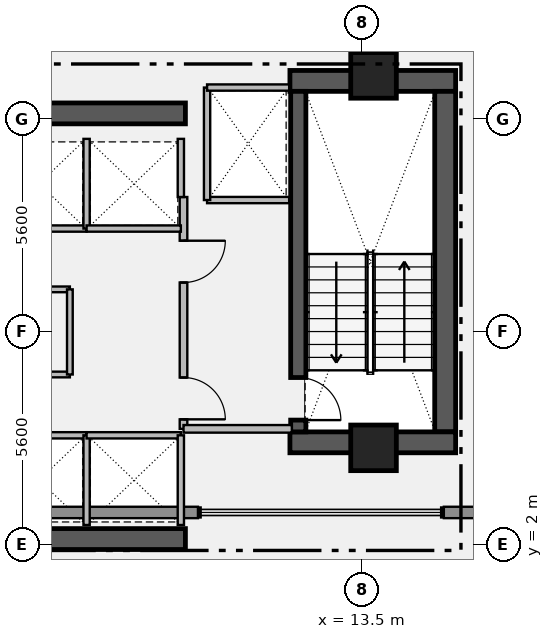
"""IFC4 building model, lengths in metres.
Left out: names, types, materials, properties, quantities, classifications, styles, units other than length and angle.
Written with IfcOpenShell. Run it as: python <this file> out.ifc"""

import sys

from ifc_helpers import new_model, si_unit, direction, frame, frame_2d, origin, origin_2d, place, context, subcontext, project, spatial, rectangle, extrude, element, fill, save


model = new_model("IFC4")
c1 = context("Model", 3, precision=1e-05, world=origin(), true_north=direction((0.0, 1.0)))
c2 = subcontext(c1, "Body", "Model", "MODEL_VIEW")
j1 = project(units=[si_unit("LENGTHUNIT", "METRE"), si_unit("PLANEANGLEUNIT", "RADIAN")], contexts=[c1])
p1 = place(None, origin())
s1 = spatial("IfcSite", under=j1, at=p1, CompositionType="ELEMENT")
p2 = place(p1, origin())
s2 = spatial("IfcBuilding", under=s1, at=p2, CompositionType="ELEMENT")
p3 = place(p2, frame((0.0, 0.0, 297.25)))
s3 = spatial("IfcBuildingStorey", under=s2, at=p3, CompositionType="ELEMENT", Elevation=297.25)
p4 = place(p3, frame((11.6, 14.205, 0.0), z_axis=(0.0, 0.0, 1.0), x_axis=(1.0, 0.0, 0.0)))
e1 = element("IfcWall", 1, at=p4, inside=s3, PredefinedType="SHEAR", context=c2, shape_type="SweptSolid", body=[
    extrude(rectangle(XDim=4.36, YDim=0.55, at=frame_2d((2.18, 0.0))), origin(), (0.0, 0.0, 1.0), 3.61),
])
p5 = place(p3, frame((15.685, 4.97, 0.0), z_axis=(0.0, 0.0, 1.0), x_axis=(0.0, 1.0, 0.0)))
e2 = element("IfcWall", 2, at=p5, inside=s3, PredefinedType="SHEAR", context=c2, shape_type="SweptSolid", body=[
    extrude(rectangle(XDim=8.96, YDim=0.55, at=frame_2d((4.48, 0.0))), origin(), (0.0, 0.0, 1.0), 3.61),
])
p6 = place(p3, frame((11.6, 4.695, 0.0), z_axis=(0.0, 0.0, 1.0), x_axis=(1.0, 0.0, 0.0)))
e3 = element("IfcWall", 3, at=p6, inside=s3, PredefinedType="SHEAR", context=c2, shape_type="SweptSolid", body=[
    extrude(rectangle(XDim=4.36, YDim=0.55, at=frame_2d((2.18, 0.0))), origin(), (0.0, 0.0, 1.0), 3.61),
])
for number, where, z_axis, x_axis in (
    (4, (1.25, 2.15, 0.0), (0.0, 0.0, 1.0), (1.0, 0.0, 0.0)),
    (5, (1.25, 13.35, 0.0), (0.0, 0.0, 1.0), (1.0, 0.0, 0.0)),
):
    element("IfcWall", number, at=place(p3, frame(where, z_axis=z_axis, x_axis=x_axis)), inside=s3, PredefinedType="SHEAR", context=c2, shape_type="SweptSolid", body=[
        extrude(rectangle(XDim=7.6, YDim=0.55, at=frame_2d((3.8, 0.0))), origin(), (0.0, 0.0, 1.0), 3.56),
    ])
p7 = place(p3, frame((11.82, 13.93, 0.0), z_axis=(0.0, 0.0, 1.0), x_axis=(0.0, -1.0, 0.0)))
e6 = element("IfcWall", 6, at=p7, inside=s3, PredefinedType="SHEAR", context=c2, shape_type="SweptSolid", body=[
    extrude(rectangle(XDim=8.96, YDim=0.4, at=frame_2d((4.48, 0.0))), origin(), (0.0, 0.0, 1.0), 3.61),
])
p8 = place(p7, frame((7.53, 0.0, 0.0)))
e7 = element("IfcOpeningElement", 7, at=p8, cuts=e6, PredefinedType="OPENING", context=c2, shape_type="SweptSolid", body=[
    extrude(rectangle(XDim=1.12, YDim=2.22, at=frame_2d((0.56, 1.11))), frame((0.0, 0.21, 0.0), z_axis=(0.0, -1.0, 0.0), x_axis=(1.0, 0.0, 0.0)), (0.0, 0.0, 1.0), 0.42),
])
for number, where, z_axis, x_axis in (
    (8, (13.8, 14.35, 0.0), (0.0, 0.0, 1.0), (1.0, 0.0, 0.0)),
    (9, (13.8, 4.55, 0.0), (0.0, 0.0, 1.0), (1.0, 0.0, 0.0)),
):
    element("IfcColumn", number, at=place(p3, frame(where, z_axis=z_axis, x_axis=x_axis)), inside=s3, PredefinedType="COLUMN", context=c2, shape_type="SweptSolid", body=[
        extrude(rectangle(XDim=1.2, YDim=1.2, at=origin_2d()), origin(), (0.0, 0.0, 1.0), 3.8),
    ])
p9 = place(p3, frame((16.8, 2.85, 0.0), z_axis=(0.0, 0.0, 1.0), x_axis=(-1.0, 0.0, 0.0)))
e10 = element("IfcWall", 10, at=p9, inside=s3, PredefinedType="STANDARD", context=c2, shape_type="SweptSolid", body=[
    extrude(rectangle(XDim=1.15, YDim=0.3, at=frame_2d((0.575, 0.0))), origin(), (0.0, 0.0, 1.0), 3.56),
])
p10 = place(p3, frame((9.18, 2.85, 0.0), z_axis=(0.0, 0.0, 1.0), x_axis=(-1.0, 0.0, 0.0)))
e11 = element("IfcWall", 11, at=p10, inside=s3, PredefinedType="STANDARD", context=c2, shape_type="SweptSolid", body=[
    extrude(rectangle(XDim=5.86, YDim=0.3, at=frame_2d((2.93, 0.0))), origin(), (0.0, 0.0, 1.0), 3.56),
])
p11 = place(p3, frame((8.8, 11.15, 0.0), z_axis=(0.0, 0.0, 1.0), x_axis=(0.0, -1.0, 0.0)))
e12 = element("IfcWall", 12, at=p11, inside=s3, PredefinedType="PARTITIONING", context=c2, shape_type="SweptSolid", body=[
    extrude(rectangle(XDim=6.1, YDim=0.2, at=frame_2d((3.05, 0.0))), origin(), (0.0, 0.0, 1.0), 3.56),
])
p12 = place(p11, frame((1.15, 0.0, 0.0)))
e13 = element("IfcOpeningElement", 13, at=p12, cuts=e12, PredefinedType="OPENING", context=c2, shape_type="SweptSolid", body=[
    extrude(rectangle(XDim=1.1, YDim=2.2, at=frame_2d((0.55, 1.1))), frame((0.0, 0.11, 0.0), z_axis=(0.0, -1.0, 0.0), x_axis=(1.0, 0.0, 0.0)), (0.0, 0.0, 1.0), 0.22),
])
p13 = place(p11, frame((4.75, 0.0, 0.0)))
e14 = element("IfcOpeningElement", 14, at=p13, cuts=e12, PredefinedType="OPENING", context=c2, shape_type="SweptSolid", body=[
    extrude(rectangle(XDim=1.1, YDim=2.2, at=frame_2d((0.55, 1.1))), frame((0.0, 0.11, 0.0), z_axis=(0.0, -1.0, 0.0), x_axis=(1.0, 0.0, 0.0)), (0.0, 0.0, 1.0), 0.22),
])
p14 = place(p3, frame((1.32, 6.48, 0.0), z_axis=(0.0, 0.0, 1.0), x_axis=(1.0, 0.0, 0.0)))
e15 = element("IfcWall", 15, at=p14, inside=s3, PredefinedType="PARTITIONING", context=c2, shape_type="SweptSolid", body=[
    extrude(rectangle(XDim=4.49, YDim=0.15, at=frame_2d((2.245, 0.0))), origin(), (0.0, 0.0, 1.0), 3.56),
])
p15 = place(p14, frame((1.795, 0.0, 0.0)))
e16 = element("IfcOpeningElement", 16, at=p15, cuts=e15, PredefinedType="OPENING", context=c2, shape_type="SweptSolid", body=[
    extrude(rectangle(XDim=0.9, YDim=2.15, at=frame_2d((0.45, 1.075))), frame((0.0, 0.085, 0.0), z_axis=(0.0, -1.0, 0.0), x_axis=(1.0, 0.0, 0.0)), (0.0, 0.0, 1.0), 0.17),
])
p16 = place(p3, frame((8.8, 5.05, 0.0), z_axis=(0.0, 0.0, 1.0), x_axis=(1.0, 0.0, 0.0)))
e17 = element("IfcWall", 17, at=p16, inside=s3, PredefinedType="PARTITIONING", context=c2, shape_type="SweptSolid", body=[
    extrude(rectangle(XDim=2.85, YDim=0.2, at=frame_2d((1.425, 0.0))), origin(), (0.0, 0.0, 1.0), 3.56),
])
p17 = place(p3, frame((9.42, 11.07, 0.0), z_axis=(0.0, 0.0, 1.0), x_axis=(1.0, 0.0, 0.0)))
e18 = element("IfcWall", 18, at=p17, inside=s3, PredefinedType="PARTITIONING", context=c2, shape_type="SweptSolid", body=[
    extrude(rectangle(XDim=2.16, YDim=0.165, at=frame_2d((1.08, 0.0))), origin(), (0.0, 0.0, 1.0), 3.56),
])
p18 = place(p3, frame((9.42, 11.07, 0.0), z_axis=(0.0, 0.0, 1.0), x_axis=(0.0, 1.0, 0.0)))
e19 = element("IfcWall", 19, at=p18, inside=s3, PredefinedType="PARTITIONING", context=c2, shape_type="SweptSolid", body=[
    extrude(rectangle(XDim=2.96, YDim=0.165, at=frame_2d((1.48, 0.0))), origin(), (0.0, 0.0, 1.0), 3.56),
])
p19 = place(p3, frame((9.42, 14.03, 0.0), z_axis=(0.0, 0.0, 1.0), x_axis=(1.0, 0.0, 0.0)))
e20 = element("IfcWall", 20, at=p19, inside=s3, PredefinedType="PARTITIONING", context=c2, shape_type="SweptSolid", body=[
    extrude(rectangle(XDim=2.16, YDim=0.165, at=frame_2d((1.08, 0.0))), origin(), (0.0, 0.0, 1.0), 3.56),
])
p20 = place(p3, frame((3.77, 4.88, 0.0), z_axis=(0.0, 0.0, 1.0), x_axis=(1.0, 0.0, 0.0)))
e21 = element("IfcWall", 21, at=p20, inside=s3, PredefinedType="PARTITIONING", context=c2, shape_type="SweptSolid", body=[
    extrude(rectangle(XDim=2.48, YDim=0.165, at=frame_2d((1.24, 0.0))), origin(), (0.0, 0.0, 1.0), 3.56),
])
p21 = place(p3, frame((6.25, 2.52, 0.0), z_axis=(0.0, 0.0, 1.0), x_axis=(0.0, 1.0, 0.0)))
e22 = element("IfcWall", 22, at=p21, inside=s3, PredefinedType="PARTITIONING", context=c2, shape_type="SweptSolid", body=[
    extrude(rectangle(XDim=2.36, YDim=0.165, at=frame_2d((1.18, 0.0))), origin(), (0.0, 0.0, 1.0), 3.56),
])
p22 = place(p3, frame((6.25, 4.88, 0.0), z_axis=(0.0, 0.0, 1.0), x_axis=(1.0, 0.0, 0.0)))
e23 = element("IfcWall", 23, at=p22, inside=s3, PredefinedType="PARTITIONING", context=c2, shape_type="SweptSolid", body=[
    extrude(rectangle(XDim=2.48, YDim=0.165, at=frame_2d((1.24, 0.0))), origin(), (0.0, 0.0, 1.0), 3.56),
])
p23 = place(p3, frame((8.73, 2.52, 0.0), z_axis=(0.0, 0.0, 1.0), x_axis=(0.0, 1.0, 0.0)))
e24 = element("IfcWall", 24, at=p23, inside=s3, PredefinedType="PARTITIONING", context=c2, shape_type="SweptSolid", body=[
    extrude(rectangle(XDim=2.36, YDim=0.165, at=frame_2d((1.18, 0.0))), origin(), (0.0, 0.0, 1.0), 3.56),
])
p24 = place(p3, frame((3.77, 10.32, 0.0), z_axis=(0.0, 0.0, 1.0), x_axis=(1.0, 0.0, 0.0)))
e25 = element("IfcWall", 25, at=p24, inside=s3, PredefinedType="PARTITIONING", context=c2, shape_type="SweptSolid", body=[
    extrude(rectangle(XDim=2.48, YDim=0.165, at=frame_2d((1.24, 0.0))), origin(), (0.0, 0.0, 1.0), 3.56),
])
p25 = place(p3, frame((6.25, 10.32, 0.0), z_axis=(0.0, 0.0, 1.0), x_axis=(0.0, 1.0, 0.0)))
e26 = element("IfcWall", 26, at=p25, inside=s3, PredefinedType="PARTITIONING", context=c2, shape_type="SweptSolid", body=[
    extrude(rectangle(XDim=2.36, YDim=0.165, at=frame_2d((1.18, 0.0))), origin(), (0.0, 0.0, 1.0), 3.56),
])
p26 = place(p3, frame((6.25, 10.32, 0.0), z_axis=(0.0, 0.0, 1.0), x_axis=(1.0, 0.0, 0.0)))
e27 = element("IfcWall", 27, at=p26, inside=s3, PredefinedType="PARTITIONING", context=c2, shape_type="SweptSolid", body=[
    extrude(rectangle(XDim=2.48, YDim=0.165, at=frame_2d((1.24, 0.0))), origin(), (0.0, 0.0, 1.0), 3.56),
])
p27 = place(p3, frame((8.73, 11.15, 0.0), z_axis=(0.0, 0.0, 1.0), x_axis=(0.0, 1.0, 0.0)))
e28 = element("IfcWall", 28, at=p27, inside=s3, PredefinedType="PARTITIONING", context=c2, shape_type="SweptSolid", body=[
    extrude(rectangle(XDim=1.53, YDim=0.165, at=frame_2d((0.765, 0.0))), origin(), (0.0, 0.0, 1.0), 3.56),
])
p28 = place(p3, frame((1.32, 8.72, 0.0), z_axis=(0.0, 0.0, 1.0), x_axis=(1.0, 0.0, 0.0)))
e29 = element("IfcWall", 29, at=p28, inside=s3, PredefinedType="PARTITIONING", context=c2, shape_type="SweptSolid", body=[
    extrude(rectangle(XDim=4.49, YDim=0.15, at=frame_2d((2.245, 0.0))), origin(), (0.0, 0.0, 1.0), 3.56),
])
p29 = place(p3, frame((5.81, 6.48, 0.0), z_axis=(0.0, 0.0, 1.0), x_axis=(0.0, 1.0, 0.0)))
e30 = element("IfcWall", 30, at=p29, inside=s3, PredefinedType="PARTITIONING", context=c2, shape_type="SweptSolid", body=[
    extrude(rectangle(XDim=2.24, YDim=0.15, at=frame_2d((1.12, 0.0))), origin(), (0.0, 0.0, 1.0), 3.56),
])
p30 = place(p8, origin())
e31 = element("IfcDoor", 31, at=p30, inside=s3, OperationType="SINGLE_SWING_RIGHT", PredefinedType="DOOR", context=c2, shape_type="SweptSolid", body=[
    extrude(rectangle(XDim=1.12, YDim=2.22, at=frame_2d((0.56, 1.11))), frame((0.0, 0.025, 0.0), z_axis=(0.0, -1.0, 0.0), x_axis=(1.0, 0.0, 0.0)), (0.0, 0.0, 1.0), 0.05),
])
fill(e7, e31)
p31 = place(p12, origin())
e32 = element("IfcDoor", 32, at=p31, inside=s3, OperationType="SINGLE_SWING_LEFT", PredefinedType="DOOR", context=c2, shape_type="SweptSolid", body=[
    extrude(rectangle(XDim=1.1, YDim=2.2, at=frame_2d((0.55, 1.1))), frame((0.0, 0.025, 0.0), z_axis=(0.0, -1.0, 0.0), x_axis=(1.0, 0.0, 0.0)), (0.0, 0.0, 1.0), 0.05),
])
fill(e13, e32)
p32 = place(p13, origin())
e33 = element("IfcDoor", 33, at=p32, inside=s3, OperationType="SINGLE_SWING_RIGHT", PredefinedType="DOOR", context=c2, shape_type="SweptSolid", body=[
    extrude(rectangle(XDim=1.1, YDim=2.2, at=frame_2d((0.55, 1.1))), frame((0.0, 0.025, 0.0), z_axis=(0.0, -1.0, 0.0), x_axis=(1.0, 0.0, 0.0)), (0.0, 0.0, 1.0), 0.05),
])
fill(e14, e33)
save(model, sys.argv[1])
